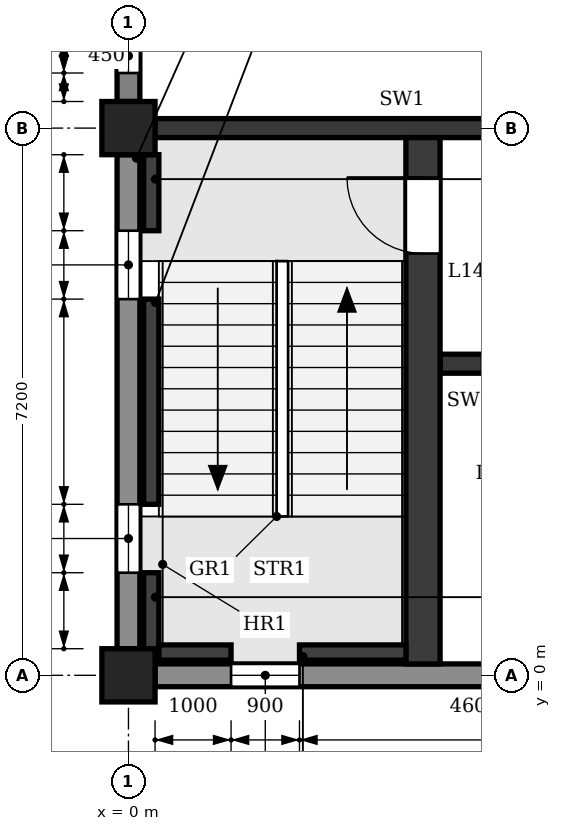
"""IFC4 building model, lengths in metres.
Left out: names, types, materials, properties, quantities, classifications, styles, units other than length and angle.
Written with IfcOpenShell. Run it as: python <this file> out.ifc"""

import sys

from ifc_helpers import new_model, si_unit, direction, frame, frame_2d, origin, origin_2d, place, context, subcontext, project, spatial, polyline, rectangle, outline, extrude, element, fill, save


model = new_model("IFC4")
c1 = context("Model", 3, precision=1e-05, world=origin(), true_north=direction((0.0, 1.0)))
c2 = subcontext(c1, "Body", "Model", "MODEL_VIEW")
j1 = project(units=[si_unit("LENGTHUNIT", "METRE"), si_unit("PLANEANGLEUNIT", "RADIAN")], contexts=[c1])
p1 = place(None, origin())
s1 = spatial("IfcSite", under=j1, at=p1, CompositionType="ELEMENT")
p2 = place(p1, origin())
s2 = spatial("IfcBuilding", under=s1, at=p2, CompositionType="ELEMENT")
p3 = place(p2, frame((0.0, 0.0, 67.8)))
s3 = spatial("IfcBuildingStorey", under=s2, at=p3, CompositionType="ELEMENT", Elevation=67.8)
for number, where, z_axis, x_axis in (
    (1, (0.0, 0.0, 0.0), (0.0, 0.0, 1.0), (1.0, 0.0, 0.0)),
    (2, (0.0, 7.2, 0.0), (0.0, 0.0, 1.0), (1.0, 0.0, 0.0)),
):
    element("IfcColumn", number, at=place(p3, frame(where, z_axis=z_axis, x_axis=x_axis)), inside=s3, PredefinedType="COLUMN", context=c2, shape_type="SweptSolid", body=[
        extrude(rectangle(XDim=0.7, YDim=0.7, at=origin_2d()), origin(), (0.0, 0.0, 1.0), 4.5),
    ])
p4 = place(p3, frame((0.0, 0.35, 0.0), z_axis=(0.0, 0.0, 1.0), x_axis=(0.0, 1.0, 0.0)))
e3 = element("IfcWall", 3, at=p4, inside=s3, PredefinedType="STANDARD", context=c2, shape_type="SweptSolid", body=[
    extrude(rectangle(XDim=6.5, YDim=0.3, at=frame_2d((3.25, 0.0))), origin(), (0.0, 0.0, 1.0), 3.65),
])
p5 = place(p4, frame((1.0, 0.0, 0.9)))
e4 = element("IfcOpeningElement", 4, at=p5, cuts=e3, PredefinedType="OPENING", context=c2, shape_type="SweptSolid", body=[
    extrude(outline(polyline([(0.0, 0.0), (0.9, 0.0), (0.9, 2.25), (0.45, 2.7), (0.0, 2.25), (0.0, 0.0)])), frame((0.0, 0.16, 0.0), z_axis=(0.0, -1.0, 0.0), x_axis=(1.0, 0.0, 0.0)), (0.0, 0.0, 1.0), 0.32),
])
p6 = place(p4, frame((4.6, 0.0, 0.9)))
e5 = element("IfcOpeningElement", 5, at=p6, cuts=e3, PredefinedType="OPENING", context=c2, shape_type="SweptSolid", body=[
    extrude(outline(polyline([(0.0, 0.0), (0.9, 0.0), (0.9, 2.25), (0.45, 2.7), (0.0, 2.25), (0.0, 0.0)])), frame((0.0, 0.16, 0.0), z_axis=(0.0, -1.0, 0.0), x_axis=(1.0, 0.0, 0.0)), (0.0, 0.0, 1.0), 0.32),
])
p7 = place(p3, frame((0.0, 7.55, 0.0), z_axis=(0.0, 0.0, 1.0), x_axis=(0.0, 1.0, 0.0)))
e6 = element("IfcWall", 6, at=p7, inside=s3, PredefinedType="STANDARD", context=c2, shape_type="SweptSolid", body=[
    extrude(rectangle(XDim=6.5, YDim=0.3, at=frame_2d((3.25, 0.0))), origin(), (0.0, 0.0, 1.0), 3.65),
])
p8 = place(p7, frame((0.375, 0.0, 1.5)))
e7 = element("IfcOpeningElement", 7, at=p8, cuts=e6, PredefinedType="OPENING", context=c2, shape_type="SweptSolid", body=[
    extrude(outline(polyline([(0.0, 0.0), (0.45, 0.0), (0.45, 1.85), (0.225, 2.1), (0.0, 1.85), (0.0, 0.0)])), frame((0.0, 0.16, 0.0), z_axis=(0.0, -1.0, 0.0), x_axis=(1.0, 0.0, 0.0)), (0.0, 0.0, 1.0), 0.32),
])
p9 = place(p7, frame((1.075, 0.0, 0.9)))
e8 = element("IfcOpeningElement", 8, at=p9, cuts=e6, PredefinedType="OPENING", context=c2, shape_type="SweptSolid", body=[
    extrude(outline(polyline([(0.0, 0.0), (0.75, 0.0), (0.75, 2.25), (0.375, 2.7), (0.0, 2.25), (0.0, 0.0)])), frame((0.0, 0.16, 0.0), z_axis=(0.0, -1.0, 0.0), x_axis=(1.0, 0.0, 0.0)), (0.0, 0.0, 1.0), 0.32),
])
p10 = place(p7, frame((2.075, 0.0, 1.5)))
e9 = element("IfcOpeningElement", 9, at=p10, cuts=e6, PredefinedType="OPENING", context=c2, shape_type="SweptSolid", body=[
    extrude(outline(polyline([(0.0, 0.0), (0.45, 0.0), (0.45, 1.85), (0.225, 2.1), (0.0, 1.85), (0.0, 0.0)])), frame((0.0, 0.16, 0.0), z_axis=(0.0, -1.0, 0.0), x_axis=(1.0, 0.0, 0.0)), (0.0, 0.0, 1.0), 0.32),
])
p11 = place(p7, frame((3.975, 0.0, 1.5)))
e10 = element("IfcOpeningElement", 10, at=p11, cuts=e6, PredefinedType="OPENING", context=c2, shape_type="SweptSolid", body=[
    extrude(outline(polyline([(0.0, 0.0), (0.45, 0.0), (0.45, 1.85), (0.225, 2.1), (0.0, 1.85), (0.0, 0.0)])), frame((0.0, 0.16, 0.0), z_axis=(0.0, -1.0, 0.0), x_axis=(1.0, 0.0, 0.0)), (0.0, 0.0, 1.0), 0.32),
])
p12 = place(p7, frame((4.675, 0.0, 0.9)))
e11 = element("IfcOpeningElement", 11, at=p12, cuts=e6, PredefinedType="OPENING", context=c2, shape_type="SweptSolid", body=[
    extrude(outline(polyline([(0.0, 0.0), (0.75, 0.0), (0.75, 2.25), (0.375, 2.7), (0.0, 2.25), (0.0, 0.0)])), frame((0.0, 0.16, 0.0), z_axis=(0.0, -1.0, 0.0), x_axis=(1.0, 0.0, 0.0)), (0.0, 0.0, 1.0), 0.32),
])
p13 = place(p7, frame((5.675, 0.0, 1.5)))
e12 = element("IfcOpeningElement", 12, at=p13, cuts=e6, PredefinedType="OPENING", context=c2, shape_type="SweptSolid", body=[
    extrude(outline(polyline([(0.0, 0.0), (0.45, 0.0), (0.45, 1.85), (0.225, 2.1), (0.0, 1.85), (0.0, 0.0)])), frame((0.0, 0.16, 0.0), z_axis=(0.0, -1.0, 0.0), x_axis=(1.0, 0.0, 0.0)), (0.0, 0.0, 1.0), 0.32),
])
p14 = place(p3, frame((0.35, 0.0, 0.0), z_axis=(0.0, 0.0, 1.0), x_axis=(1.0, 0.0, 0.0)))
e13 = element("IfcWall", 13, at=p14, inside=s3, PredefinedType="STANDARD", context=c2, shape_type="SweptSolid", body=[
    extrude(rectangle(XDim=6.5, YDim=0.3, at=frame_2d((3.25, 0.0))), origin(), (0.0, 0.0, 1.0), 3.65),
])
p15 = place(p14, frame((1.0, 0.0, 0.9)))
e14 = element("IfcOpeningElement", 14, at=p15, cuts=e13, PredefinedType="OPENING", context=c2, shape_type="SweptSolid", body=[
    extrude(outline(polyline([(0.0, 0.0), (0.9, 0.0), (0.9, 2.25), (0.45, 2.7), (0.0, 2.25), (0.0, 0.0)])), frame((0.0, 0.16, 0.0), z_axis=(0.0, -1.0, 0.0), x_axis=(1.0, 0.0, 0.0)), (0.0, 0.0, 1.0), 0.32),
])
p16 = place(p3, frame((0.35, 7.2, 0.0), z_axis=(0.0, 0.0, 1.0), x_axis=(1.0, 0.0, 0.0)))
e15 = element("IfcWall", 15, at=p16, inside=s3, PredefinedType="SHEAR", context=c2, shape_type="SweptSolid", body=[
    extrude(rectangle(XDim=6.5, YDim=0.25, at=frame_2d((3.25, 0.0))), origin(), (0.0, 0.0, 1.0), 3.6),
])
p17 = place(p16, frame((4.9, 0.0, 0.0)))
e16 = element("IfcOpeningElement", 16, at=p17, cuts=e15, PredefinedType="OPENING", context=c2, shape_type="SweptSolid", body=[
    extrude(rectangle(XDim=1.1, YDim=2.1, at=frame_2d((0.55, 1.05))), frame((0.0, 0.135, 0.0), z_axis=(0.0, -1.0, 0.0), x_axis=(1.0, 0.0, 0.0)), (0.0, 0.0, 1.0), 0.27),
])
p18 = place(p3, frame((0.3, 0.35, -0.25), z_axis=(0.0, 0.0, 1.0), x_axis=(0.0, 1.0, 0.0)))
e17 = element("IfcWall", 17, at=p18, inside=s3, PredefinedType="SHEAR", context=c2, shape_type="SweptSolid", body=[
    extrude(rectangle(XDim=1.0, YDim=0.2, at=frame_2d((0.5, 0.0))), origin(), (0.0, 0.0, 1.0), 4.5),
])
p19 = place(p3, frame((0.3, 2.25, -0.25), z_axis=(0.0, 0.0, 1.0), x_axis=(0.0, 1.0, 0.0)))
e18 = element("IfcWall", 18, at=p19, inside=s3, PredefinedType="SHEAR", context=c2, shape_type="SweptSolid", body=[
    extrude(rectangle(XDim=2.7, YDim=0.2, at=frame_2d((1.35, 0.0))), origin(), (0.0, 0.0, 1.0), 4.5),
])
p20 = place(p3, frame((0.3, 5.85, -0.25), z_axis=(0.0, 0.0, 1.0), x_axis=(0.0, 1.0, 0.0)))
e19 = element("IfcWall", 19, at=p20, inside=s3, PredefinedType="SHEAR", context=c2, shape_type="SweptSolid", body=[
    extrude(rectangle(XDim=1.0, YDim=0.2, at=frame_2d((0.5, 0.0))), origin(), (0.0, 0.0, 1.0), 4.5),
])
p21 = place(p3, frame((0.4, 0.3, -0.25), z_axis=(0.0, 0.0, 1.0), x_axis=(1.0, 0.0, 0.0)))
e20 = element("IfcWall", 20, at=p21, inside=s3, PredefinedType="SHEAR", context=c2, shape_type="SweptSolid", body=[
    extrude(rectangle(XDim=0.95, YDim=0.2, at=frame_2d((0.475, 0.0))), origin(), (0.0, 0.0, 1.0), 4.5),
])
p22 = place(p3, frame((2.25, 0.3, -0.25), z_axis=(0.0, 0.0, 1.0), x_axis=(1.0, 0.0, 0.0)))
e21 = element("IfcWall", 21, at=p22, inside=s3, PredefinedType="SHEAR", context=c2, shape_type="SweptSolid", body=[
    extrude(rectangle(XDim=1.4, YDim=0.2, at=frame_2d((0.7, 0.0))), origin(), (0.0, 0.0, 1.0), 4.5),
])
p23 = place(p3, frame((3.875, 0.15, 0.0), z_axis=(0.0, 0.0, 1.0), x_axis=(0.0, 1.0, 0.0)))
e22 = element("IfcWall", 22, at=p23, inside=s3, PredefinedType="SHEAR", context=c2, shape_type="SweptSolid", body=[
    extrude(rectangle(XDim=6.925, YDim=0.45, at=frame_2d((3.462, 0.0))), origin(), (0.0, 0.0, 1.0), 4.25),
])
p24 = place(p23, frame((5.4, 0.0, 0.0)))
e23 = element("IfcOpeningElement", 23, at=p24, cuts=e22, PredefinedType="OPENING", context=c2, shape_type="SweptSolid", body=[
    extrude(rectangle(XDim=1.0, YDim=2.1, at=frame_2d((0.5, 1.05))), frame((0.0, 0.235, 0.0), z_axis=(0.0, -1.0, 0.0), x_axis=(1.0, 0.0, 0.0)), (0.0, 0.0, 1.0), 0.47),
])
p25 = place(p3, frame((4.1, 4.1, 0.0), z_axis=(0.0, 0.0, 1.0), x_axis=(1.0, 0.0, 0.0)))
e24 = element("IfcWall", 24, at=p25, inside=s3, PredefinedType="SHEAR", context=c2, shape_type="SweptSolid", body=[
    extrude(rectangle(XDim=2.975, YDim=0.25, at=frame_2d((1.487, 0.0))), origin(), (0.0, 0.0, 1.0), 4.25),
])
p26 = place(p25, frame((0.55, 0.0, 0.0)))
e25 = element("IfcOpeningElement", 25, at=p26, cuts=e24, PredefinedType="OPENING", context=c2, shape_type="SweptSolid", body=[
    extrude(rectangle(XDim=0.9, YDim=2.1, at=frame_2d((0.45, 1.05))), frame((0.0, 0.135, 0.0), z_axis=(0.0, -1.0, 0.0), x_axis=(1.0, 0.0, 0.0)), (0.0, 0.0, 1.0), 0.27),
])
p27 = place(p15, origin())
e26 = element("IfcWindow", 26, at=p27, inside=s3, PartitioningType="SINGLE_PANEL", PredefinedType="WINDOW", context=c2, shape_type="SweptSolid", body=[
    extrude(outline(polyline([(0.0, 0.0), (0.9, 0.0), (0.9, 2.25), (0.45, 2.7), (0.0, 2.25), (0.0, 0.0)])), frame((0.0, 0.03, 0.0), z_axis=(0.0, -1.0, 0.0), x_axis=(1.0, 0.0, 0.0)), (0.0, 0.0, 1.0), 0.06),
])
fill(e14, e26)
p28 = place(p5, origin())
e27 = element("IfcWindow", 27, at=p28, inside=s3, PartitioningType="SINGLE_PANEL", PredefinedType="WINDOW", context=c2, shape_type="SweptSolid", body=[
    extrude(outline(polyline([(0.0, 0.0), (0.9, 0.0), (0.9, 2.25), (0.45, 2.7), (0.0, 2.25), (0.0, 0.0)])), frame((0.0, 0.03, 0.0), z_axis=(0.0, -1.0, 0.0), x_axis=(1.0, 0.0, 0.0)), (0.0, 0.0, 1.0), 0.06),
])
fill(e4, e27)
p29 = place(p6, origin())
e28 = element("IfcWindow", 28, at=p29, inside=s3, PartitioningType="SINGLE_PANEL", PredefinedType="WINDOW", context=c2, shape_type="SweptSolid", body=[
    extrude(outline(polyline([(0.0, 0.0), (0.9, 0.0), (0.9, 2.25), (0.45, 2.7), (0.0, 2.25), (0.0, 0.0)])), frame((0.0, 0.03, 0.0), z_axis=(0.0, -1.0, 0.0), x_axis=(1.0, 0.0, 0.0)), (0.0, 0.0, 1.0), 0.06),
])
fill(e5, e28)
p30 = place(p8, origin())
e29 = element("IfcWindow", 29, at=p30, inside=s3, PartitioningType="SINGLE_PANEL", PredefinedType="WINDOW", context=c2, shape_type="SweptSolid", body=[
    extrude(outline(polyline([(0.0, 0.0), (0.45, 0.0), (0.45, 1.85), (0.225, 2.1), (0.0, 1.85), (0.0, 0.0)])), frame((0.0, 0.03, 0.0), z_axis=(0.0, -1.0, 0.0), x_axis=(1.0, 0.0, 0.0)), (0.0, 0.0, 1.0), 0.06),
])
fill(e7, e29)
p31 = place(p24, origin())
e30 = element("IfcDoor", 30, at=p31, inside=s3, OperationType="SINGLE_SWING_RIGHT", PredefinedType="DOOR", context=c2, shape_type="SweptSolid", body=[
    extrude(rectangle(XDim=1.0, YDim=2.1, at=frame_2d((0.5, 1.05))), frame((0.0, 0.025, 0.0), z_axis=(0.0, -1.0, 0.0), x_axis=(1.0, 0.0, 0.0)), (0.0, 0.0, 1.0), 0.05),
])
fill(e23, e30)
save(model, sys.argv[1])
